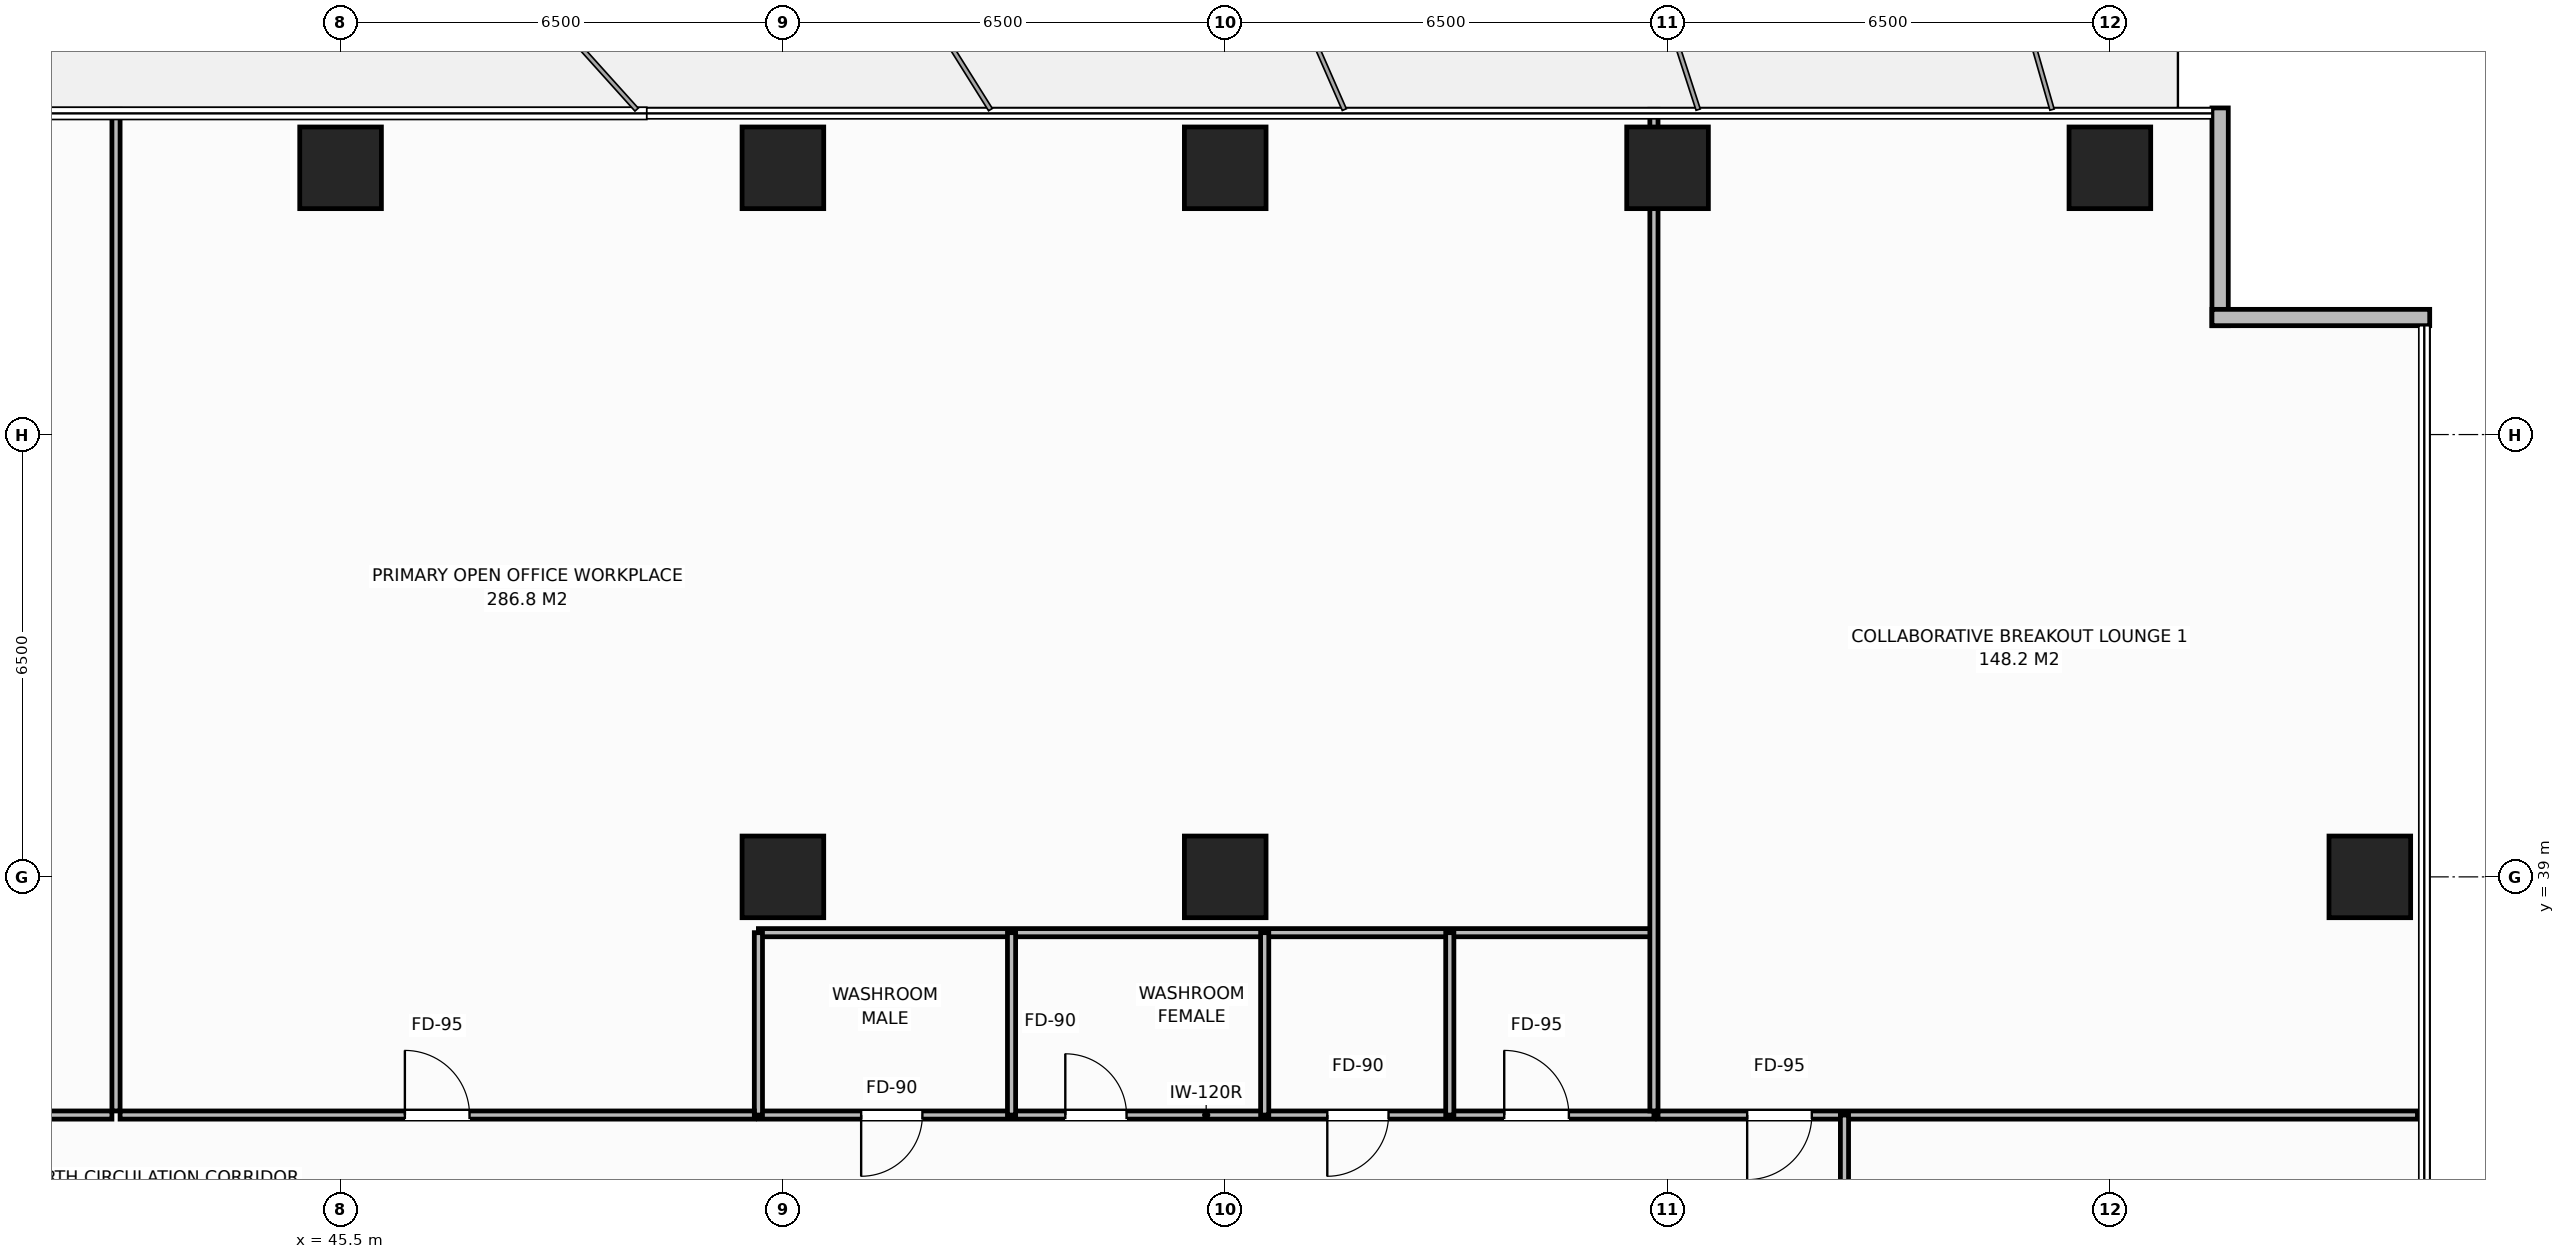
"""IFC4 building model, lengths in metres.
Left out: names, types, materials, properties, quantities, classifications, styles, units other than length and angle.
Written with IfcOpenShell. Run it as: python <this file> out.ifc"""

import sys

from ifc_helpers import new_model, si_unit, direction, frame, frame_2d, origin, origin_2d, place, context, subcontext, project, spatial, rectangle, extrude, element, fill, save


model = new_model("IFC4")
c1 = context("Model", 3, precision=1e-05, world=origin(), true_north=direction((0.0, 1.0)))
c2 = subcontext(c1, "Body", "Model", "MODEL_VIEW")
j1 = project(units=[si_unit("LENGTHUNIT", "METRE"), si_unit("PLANEANGLEUNIT", "RADIAN")], contexts=[c1])
p1 = place(None, origin())
s1 = spatial("IfcSite", under=j1, at=p1, CompositionType="ELEMENT")
p2 = place(p1, origin())
s2 = spatial("IfcBuilding", under=s1, at=p2, CompositionType="ELEMENT")
p3 = place(p2, frame((0.0, 0.0, 86.0)))
s3 = spatial("IfcBuildingStorey", under=s2, at=p3, CompositionType="ELEMENT", Elevation=86.0)
for number, where, z_axis, x_axis in (
    (1, (58.5, 39.0, 0.0), (0.0, 0.0, 1.0), (1.0, 0.0, 0.0)),
    (2, (52.0, 39.0, 0.0), (0.0, 0.0, 1.0), (1.0, 0.0, 0.0)),
    (3, (45.5, 49.42, 0.0), (0.0, 0.0, 1.0), (1.0, 0.0, 0.0)),
    (4, (52.0, 49.42, 0.0), (0.0, 0.0, 1.0), (1.0, 0.0, 0.0)),
    (5, (58.5, 49.42, 0.0), (0.0, 0.0, 1.0), (1.0, 0.0, 0.0)),
    (6, (65.0, 49.42, 0.0), (0.0, 0.0, 1.0), (1.0, 0.0, 0.0)),
    (7, (71.5, 49.42, 0.0), (0.0, 0.0, 1.0), (1.0, 0.0, 0.0)),
    (8, (75.32, 39.0, 0.0), (0.0, 0.0, 1.0), (1.0, 0.0, 0.0)),
):
    element("IfcColumn", number, at=place(p3, frame(where, z_axis=z_axis, x_axis=x_axis)), inside=s3, PredefinedType="COLUMN", context=c2, shape_type="SweptSolid", body=[
        extrude(rectangle(XDim=1.2, YDim=1.2, at=origin_2d()), origin(), (0.0, 0.0, 1.0), 3.8),
    ])
for number, where, z_axis, x_axis in (
    (9, (73.12, 50.3, 0.0), (0.0, 0.0, 1.0), (0.0, -1.0, 0.0)),
    (10, (73.0, 47.22, 0.0), (0.0, 0.0, 1.0), (1.0, 0.0, 0.0)),
):
    element("IfcWall", number, at=place(p3, frame(where, z_axis=z_axis, x_axis=x_axis)), inside=s3, PredefinedType="STANDARD", context=c2, shape_type="SweptSolid", body=[
        extrude(rectangle(XDim=3.2, YDim=0.24, at=frame_2d((1.6, 0.0))), origin(), (0.0, 0.0, 1.0), 3.565),
    ])
p4 = place(p3, frame((51.64, 35.5, 0.0), z_axis=(0.0, 0.0, 1.0), x_axis=(1.0, 0.0, 0.0)))
e11 = element("IfcWall", 11, at=p4, inside=s3, PredefinedType="PARTITIONING", context=c2, shape_type="SweptSolid", body=[
    extrude(rectangle(XDim=13.16, YDim=0.12, at=frame_2d((6.58, 0.0))), origin(), (0.0, 0.0, 1.0), 3.565),
])
p5 = place(p4, frame((1.51, 0.0, 0.0)))
e12 = element("IfcOpeningElement", 12, at=p5, cuts=e11, PredefinedType="OPENING", context=c2, shape_type="SweptSolid", body=[
    extrude(rectangle(XDim=0.9, YDim=2.15, at=frame_2d((0.45, 1.075))), frame((0.0, 0.07, 0.0), z_axis=(0.0, -1.0, 0.0), x_axis=(1.0, 0.0, 0.0)), (0.0, 0.0, 1.0), 0.14),
])
p6 = place(p4, frame((4.51, 0.0, 0.0)))
e13 = element("IfcOpeningElement", 13, at=p6, cuts=e11, PredefinedType="OPENING", context=c2, shape_type="SweptSolid", body=[
    extrude(rectangle(XDim=0.9, YDim=2.15, at=frame_2d((0.45, 1.075))), frame((0.0, 0.07, 0.0), z_axis=(0.0, -1.0, 0.0), x_axis=(1.0, 0.0, 0.0)), (0.0, 0.0, 1.0), 0.14),
])
p7 = place(p4, frame((8.36, 0.0, 0.0)))
e14 = element("IfcOpeningElement", 14, at=p7, cuts=e11, PredefinedType="OPENING", context=c2, shape_type="SweptSolid", body=[
    extrude(rectangle(XDim=0.9, YDim=2.15, at=frame_2d((0.45, 1.075))), frame((0.0, 0.07, 0.0), z_axis=(0.0, -1.0, 0.0), x_axis=(1.0, 0.0, 0.0)), (0.0, 0.0, 1.0), 0.14),
])
p8 = place(p4, frame((10.96, 0.0, 0.0)))
e15 = element("IfcOpeningElement", 15, at=p8, cuts=e11, PredefinedType="OPENING", context=c2, shape_type="SweptSolid", body=[
    extrude(rectangle(XDim=0.95, YDim=2.15, at=frame_2d((0.475, 1.075))), frame((0.0, 0.07, 0.0), z_axis=(0.0, -1.0, 0.0), x_axis=(1.0, 0.0, 0.0)), (0.0, 0.0, 1.0), 0.14),
])
p9 = place(p3, frame((51.64, 38.18, 0.0), z_axis=(0.0, 0.0, 1.0), x_axis=(1.0, 0.0, 0.0)))
e16 = element("IfcWall", 16, at=p9, inside=s3, PredefinedType="PARTITIONING", context=c2, shape_type="SweptSolid", body=[
    extrude(rectangle(XDim=13.16, YDim=0.12, at=frame_2d((6.58, 0.0))), origin(), (0.0, 0.0, 1.0), 3.565),
])
for number, where, z_axis, x_axis in (
    (17, (51.64, 35.5, 0.0), (0.0, 0.0, 1.0), (0.0, 1.0, 0.0)),
    (18, (55.36, 35.5, 0.0), (0.0, 0.0, 1.0), (0.0, 1.0, 0.0)),
    (19, (59.08, 35.5, 0.0), (0.0, 0.0, 1.0), (0.0, 1.0, 0.0)),
    (20, (61.8, 35.5, 0.0), (0.0, 0.0, 1.0), (0.0, 1.0, 0.0)),
):
    element("IfcWall", number, at=place(p3, frame(where, z_axis=z_axis, x_axis=x_axis)), inside=s3, PredefinedType="PARTITIONING", context=c2, shape_type="SweptSolid", body=[
        extrude(rectangle(XDim=2.68, YDim=0.12, at=frame_2d((1.34, 0.0))), origin(), (0.0, 0.0, 1.0), 3.565),
    ])
p10 = place(p3, frame((42.2, 35.56, 0.0), z_axis=(0.0, 0.0, 1.0), x_axis=(0.0, 1.0, 0.0)))
e21 = element("IfcWall", 21, at=p10, inside=s3, PredefinedType="PARTITIONING", context=c2, shape_type="SweptSolid", body=[
    extrude(rectangle(XDim=14.72, YDim=0.12, at=frame_2d((7.36, 0.0))), origin(), (0.0, 0.0, 1.0), 3.565),
])
p11 = place(p3, frame((31.097, 35.5, 0.0), z_axis=(0.0, 0.0, 1.0), x_axis=(1.0, 0.0, 0.0)))
e22 = element("IfcWall", 22, at=p11, inside=s3, PredefinedType="PARTITIONING", context=c2, shape_type="SweptSolid", body=[
    extrude(rectangle(XDim=11.043, YDim=0.12, at=frame_2d((5.521, 0.0))), origin(), (0.0, 0.0, 1.0), 3.565),
])
p12 = place(p11, frame((5.046, 0.0, 0.0)))
e23 = element("IfcOpeningElement", 23, at=p12, cuts=e22, PredefinedType="OPENING", context=c2, shape_type="SweptSolid", body=[
    extrude(rectangle(XDim=0.95, YDim=2.15, at=frame_2d((0.475, 1.075))), frame((0.0, 0.07, 0.0), z_axis=(0.0, -1.0, 0.0), x_axis=(1.0, 0.0, 0.0)), (0.0, 0.0, 1.0), 0.14),
])
p13 = place(p3, frame((64.8, 35.56, 0.0), z_axis=(0.0, 0.0, 1.0), x_axis=(0.0, 1.0, 0.0)))
e24 = element("IfcWall", 24, at=p13, inside=s3, PredefinedType="PARTITIONING", context=c2, shape_type="SweptSolid", body=[
    extrude(rectangle(XDim=14.72, YDim=0.12, at=frame_2d((7.36, 0.0))), origin(), (0.0, 0.0, 1.0), 2.965),
])
p14 = place(p3, frame((42.26, 35.5, 0.0), z_axis=(0.0, 0.0, 1.0), x_axis=(1.0, 0.0, 0.0)))
e25 = element("IfcWall", 25, at=p14, inside=s3, PredefinedType="PARTITIONING", context=c2, shape_type="SweptSolid", body=[
    extrude(rectangle(XDim=9.32, YDim=0.12, at=frame_2d((4.66, 0.0))), origin(), (0.0, 0.0, 1.0), 3.565),
])
p15 = place(p14, frame((4.185, 0.0, 0.0)))
e26 = element("IfcOpeningElement", 26, at=p15, cuts=e25, PredefinedType="OPENING", context=c2, shape_type="SweptSolid", body=[
    extrude(rectangle(XDim=0.95, YDim=2.15, at=frame_2d((0.475, 1.075))), frame((0.0, 0.07, 0.0), z_axis=(0.0, -1.0, 0.0), x_axis=(1.0, 0.0, 0.0)), (0.0, 0.0, 1.0), 0.14),
])
p16 = place(p3, frame((64.86, 35.5, 0.0), z_axis=(0.0, 0.0, 1.0), x_axis=(1.0, 0.0, 0.0)))
e27 = element("IfcWall", 27, at=p16, inside=s3, PredefinedType="PARTITIONING", context=c2, shape_type="SweptSolid", body=[
    extrude(rectangle(XDim=11.16, YDim=0.12, at=frame_2d((5.58, 0.0))), origin(), (0.0, 0.0, 1.0), 3.565),
])
p17 = place(p16, frame((1.31, 0.0, 0.0)))
e28 = element("IfcOpeningElement", 28, at=p17, cuts=e27, PredefinedType="OPENING", context=c2, shape_type="SweptSolid", body=[
    extrude(rectangle(XDim=0.95, YDim=2.15, at=frame_2d((0.475, 1.075))), frame((0.0, 0.07, 0.0), z_axis=(0.0, -1.0, 0.0), x_axis=(1.0, 0.0, 0.0)), (0.0, 0.0, 1.0), 0.14),
])
p18 = place(p3, frame((67.6, 16.5, 0.0), z_axis=(0.0, 0.0, 1.0), x_axis=(0.0, 1.0, 0.0)))
e29 = element("IfcWall", 29, at=p18, inside=s3, PredefinedType="PARTITIONING", context=c2, shape_type="SweptSolid", body=[
    extrude(rectangle(XDim=19.0, YDim=0.12, at=frame_2d((9.5, 0.0))), origin(), (0.0, 0.0, 1.0), 3.565),
])
p19 = place(p18, frame((9.025, 0.0, 0.0)))
e30 = element("IfcOpeningElement", 30, at=p19, cuts=e29, PredefinedType="OPENING", context=c2, shape_type="SweptSolid", body=[
    extrude(rectangle(XDim=0.95, YDim=2.15, at=frame_2d((0.475, 1.075))), frame((0.0, 0.07, 0.0), z_axis=(0.0, -1.0, 0.0), x_axis=(1.0, 0.0, 0.0)), (0.0, 0.0, 1.0), 0.14),
])
p20 = place(p5, origin())
e31 = element("IfcDoor", 31, at=p20, inside=s3, OperationType="SINGLE_SWING_RIGHT", PredefinedType="DOOR", context=c2, shape_type="SweptSolid", body=[
    extrude(rectangle(XDim=0.9, YDim=2.15, at=frame_2d((0.45, 1.075))), frame((0.0, 0.025, 0.0), z_axis=(0.0, -1.0, 0.0), x_axis=(1.0, 0.0, 0.0)), (0.0, 0.0, 1.0), 0.05),
])
fill(e12, e31)
p21 = place(p6, origin())
e32 = element("IfcDoor", 32, at=p21, inside=s3, OperationType="SINGLE_SWING_LEFT", PredefinedType="DOOR", context=c2, shape_type="SweptSolid", body=[
    extrude(rectangle(XDim=0.9, YDim=2.15, at=frame_2d((0.45, 1.075))), frame((0.0, 0.025, 0.0), z_axis=(0.0, -1.0, 0.0), x_axis=(1.0, 0.0, 0.0)), (0.0, 0.0, 1.0), 0.05),
])
fill(e13, e32)
p22 = place(p7, origin())
e33 = element("IfcDoor", 33, at=p22, inside=s3, OperationType="SINGLE_SWING_RIGHT", PredefinedType="DOOR", context=c2, shape_type="SweptSolid", body=[
    extrude(rectangle(XDim=0.9, YDim=2.15, at=frame_2d((0.45, 1.075))), frame((0.0, 0.025, 0.0), z_axis=(0.0, -1.0, 0.0), x_axis=(1.0, 0.0, 0.0)), (0.0, 0.0, 1.0), 0.05),
])
fill(e14, e33)
p23 = place(p8, origin())
e34 = element("IfcDoor", 34, at=p23, inside=s3, OperationType="SINGLE_SWING_LEFT", PredefinedType="DOOR", context=c2, shape_type="SweptSolid", body=[
    extrude(rectangle(XDim=0.95, YDim=2.15, at=frame_2d((0.475, 1.075))), frame((0.0, 0.025, 0.0), z_axis=(0.0, -1.0, 0.0), x_axis=(1.0, 0.0, 0.0)), (0.0, 0.0, 1.0), 0.05),
])
fill(e15, e34)
p24 = place(p15, origin())
e35 = element("IfcDoor", 35, at=p24, inside=s3, OperationType="SINGLE_SWING_LEFT", PredefinedType="DOOR", context=c2, shape_type="SweptSolid", body=[
    extrude(rectangle(XDim=0.95, YDim=2.15, at=frame_2d((0.475, 1.075))), frame((0.0, 0.025, 0.0), z_axis=(0.0, -1.0, 0.0), x_axis=(1.0, 0.0, 0.0)), (0.0, 0.0, 1.0), 0.05),
])
fill(e26, e35)
p25 = place(p17, origin())
e36 = element("IfcDoor", 36, at=p25, inside=s3, OperationType="SINGLE_SWING_RIGHT", PredefinedType="DOOR", context=c2, shape_type="SweptSolid", body=[
    extrude(rectangle(XDim=0.95, YDim=2.15, at=frame_2d((0.475, 1.075))), frame((0.0, 0.025, 0.0), z_axis=(0.0, -1.0, 0.0), x_axis=(1.0, 0.0, 0.0)), (0.0, 0.0, 1.0), 0.05),
])
fill(e28, e36)
save(model, sys.argv[1])
